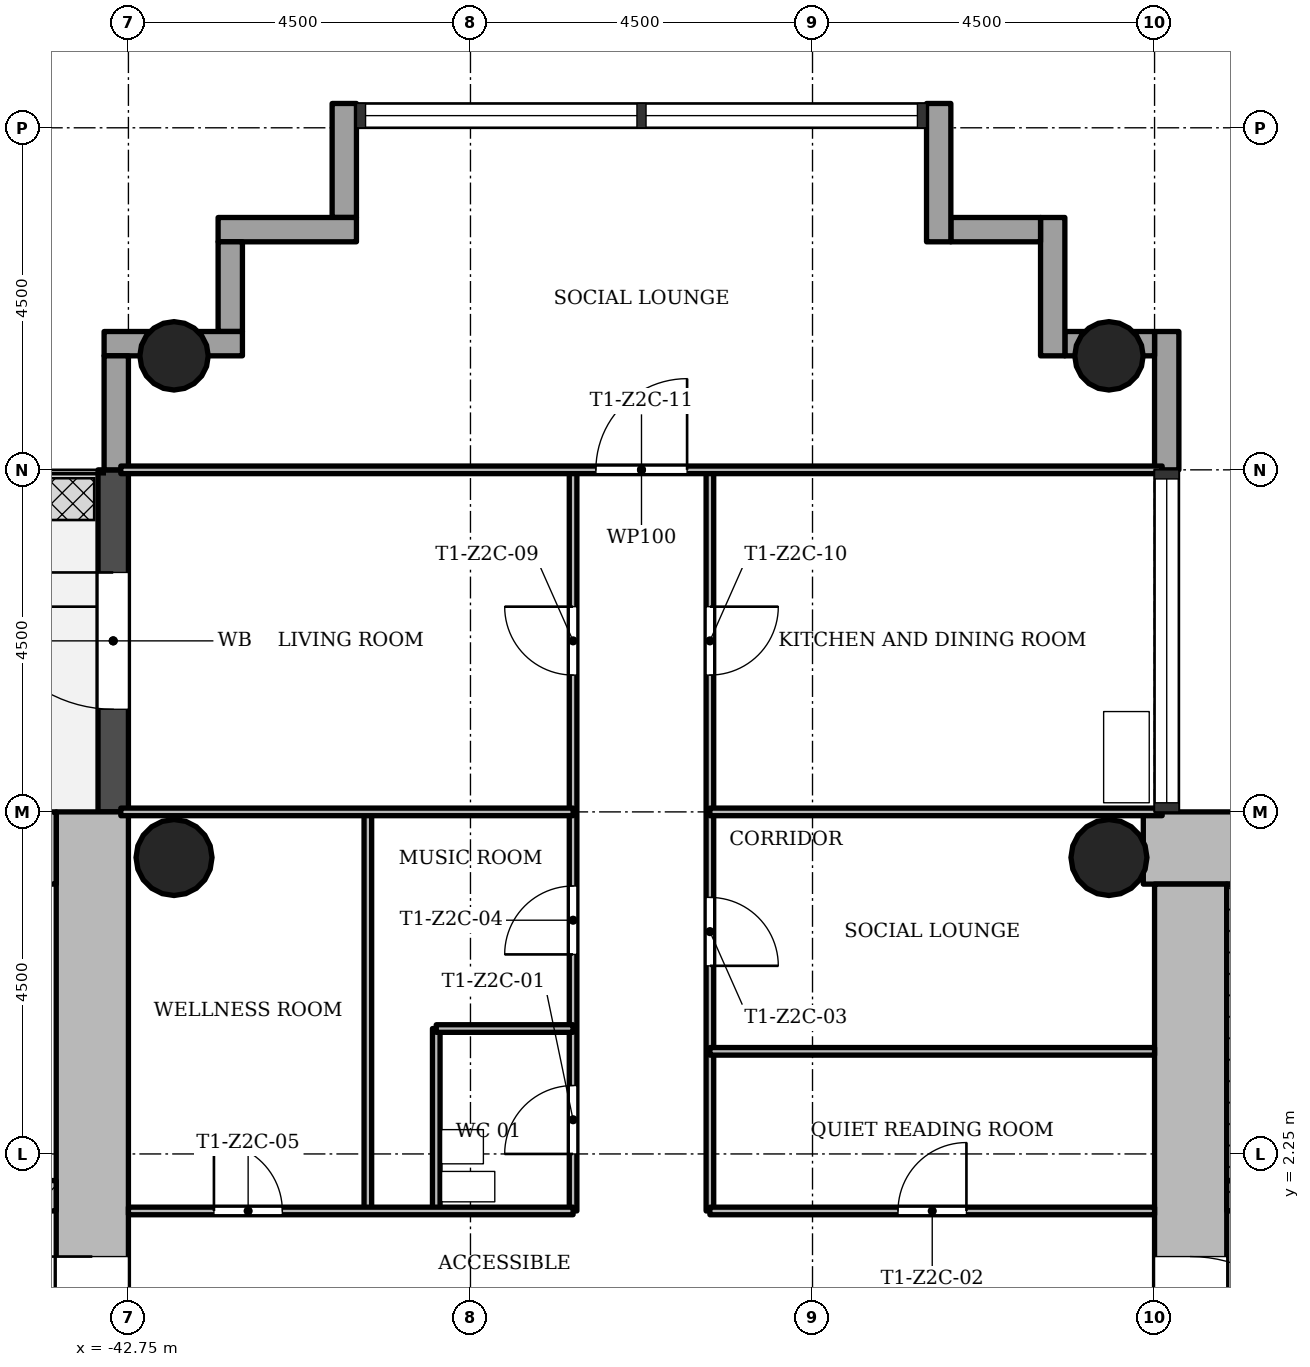
"""IFC4 building model, lengths in metres.
Left out: names, types, materials, properties, quantities, classifications, styles, units other than length and angle.
Written with IfcOpenShell. Run it as: python <this file> out.ifc"""

import sys

from ifc_helpers import new_model, si_unit, direction, frame, frame_2d, origin, origin_2d, place, context, subcontext, project, spatial, rectangle, hollow_circle, extrude, element, fill, save


model = new_model("IFC4")
c1 = context("Model", 3, precision=1e-05, world=origin(), true_north=direction((0.0, 1.0)))
c2 = subcontext(c1, "Body", "Model", "MODEL_VIEW")
j1 = project(units=[si_unit("LENGTHUNIT", "METRE"), si_unit("PLANEANGLEUNIT", "RADIAN")], contexts=[c1])
p1 = place(None, origin())
s1 = spatial("IfcSite", under=j1, at=p1, CompositionType="ELEMENT")
p2 = place(p1, origin())
s2 = spatial("IfcBuilding", under=s1, at=p2, CompositionType="ELEMENT")
p3 = place(p2, frame((0.0, 0.0, 90.2)))
s3 = spatial("IfcBuildingStorey", under=s2, at=p3, CompositionType="ELEMENT", Elevation=90.2)
p4 = place(p3, frame((-20.702, 6.275, 0.0), z_axis=(0.0, 0.0, 1.0), x_axis=(-1.0, 0.0, 0.0)))
e1 = element("IfcWall", 1, at=p4, inside=s3, PredefinedType="SHEAR", context=c2, shape_type="SweptSolid", body=[
    extrude(rectangle(XDim=8.696, YDim=0.95, at=frame_2d((4.348, 0.0))), origin(), (0.0, 0.0, 1.0), 3.4),
])
p5 = place(p3, frame((-28.775, 5.8, 0.0), z_axis=(0.0, 0.0, 1.0), x_axis=(0.0, -1.0, 0.0)))
e2 = element("IfcWall", 2, at=p5, inside=s3, PredefinedType="SHEAR", context=c2, shape_type="SweptSolid", body=[
    extrude(rectangle(XDim=12.55, YDim=0.95, at=frame_2d((6.275, 0.0))), origin(), (0.0, 0.0, 1.0), 3.4),
])
p6 = place(p5, frame((4.9, 0.0, 0.0)))
e3 = element("IfcOpeningElement", 3, at=p6, cuts=e2, PredefinedType="OPENING", context=c2, shape_type="SweptSolid", body=[
    extrude(rectangle(XDim=1.8, YDim=2.1, at=frame_2d((0.9, 1.05))), frame((0.0, 0.485, 0.0), z_axis=(0.0, -1.0, 0.0), x_axis=(1.0, 0.0, 0.0)), (0.0, 0.0, 1.0), 0.97),
])
p7 = place(p3, frame((-28.3, 1.7, 0.0), z_axis=(0.0, 0.0, 1.0), x_axis=(1.0, 0.0, 0.0)))
e4 = element("IfcWall", 4, at=p7, inside=s3, PredefinedType="SHEAR", context=c2, shape_type="SweptSolid", body=[
    extrude(rectangle(XDim=7.1, YDim=0.4, at=frame_2d((3.55, 0.0))), origin(), (0.0, 0.0, 1.0), 3.4),
])
p8 = place(p7, frame((0.7, 0.0, 0.0)))
e5 = element("IfcOpeningElement", 5, at=p8, cuts=e4, PredefinedType="OPENING", context=c2, shape_type="SweptSolid", body=[
    extrude(rectangle(XDim=0.9, YDim=2.1, at=frame_2d((0.45, 1.05))), frame((0.0, 0.21, 0.0), z_axis=(0.0, -1.0, 0.0), x_axis=(1.0, 0.0, 0.0)), (0.0, 0.0, 1.0), 0.42),
])
p9 = place(p3, frame((-43.225, -5.8, 0.0), z_axis=(0.0, 0.0, 1.0), x_axis=(0.0, 1.0, 0.0)))
e6 = element("IfcWall", 6, at=p9, inside=s3, PredefinedType="SHEAR", context=c2, shape_type="SweptSolid", body=[
    extrude(rectangle(XDim=12.55, YDim=0.95, at=frame_2d((6.275, 0.0))), origin(), (0.0, 0.0, 1.0), 3.4),
])
p10 = place(p9, frame((4.9, 0.0, 0.0)))
e7 = element("IfcOpeningElement", 7, at=p10, cuts=e6, PredefinedType="OPENING", context=c2, shape_type="SweptSolid", body=[
    extrude(rectangle(XDim=1.8, YDim=2.1, at=frame_2d((0.9, 1.05))), frame((0.0, 0.485, 0.0), z_axis=(0.0, -1.0, 0.0), x_axis=(1.0, 0.0, 0.0)), (0.0, 0.0, 1.0), 0.97),
])
p11 = place(p3, frame((-43.7, 6.275, 0.0), z_axis=(0.0, 0.0, 1.0), x_axis=(-1.0, 0.0, 0.0)))
e8 = element("IfcWall", 8, at=p11, inside=s3, PredefinedType="SHEAR", context=c2, shape_type="SweptSolid", body=[
    extrude(rectangle(XDim=8.05, YDim=0.95, at=frame_2d((4.025, 0.0))), origin(), (0.0, 0.0, 1.0), 3.4),
])
p12 = place(p3, frame((-50.8, 1.7, 0.0), z_axis=(0.0, 0.0, 1.0), x_axis=(1.0, 0.0, 0.0)))
e9 = element("IfcWall", 9, at=p12, inside=s3, PredefinedType="SHEAR", context=c2, shape_type="SweptSolid", body=[
    extrude(rectangle(XDim=7.1, YDim=0.4, at=frame_2d((3.55, 0.0))), origin(), (0.0, 0.0, 1.0), 3.4),
])
p13 = place(p12, frame((5.2, 0.0, 0.0)))
e10 = element("IfcOpeningElement", 10, at=p13, cuts=e9, PredefinedType="OPENING", context=c2, shape_type="SweptSolid", body=[
    extrude(rectangle(XDim=1.1, YDim=2.1, at=frame_2d((0.55, 1.05))), frame((0.0, 0.21, 0.0), z_axis=(0.0, -1.0, 0.0), x_axis=(1.0, 0.0, 0.0)), (0.0, 0.0, 1.0), 0.42),
])
for number, where, z_axis, x_axis in (
    (11, (-29.85, 12.75, 0.0), (0.0, 0.0, 1.0), (1.0, 0.0, 0.0)),
    (12, (-42.15, 12.75, 0.0), (0.0, 0.0, 1.0), (1.0, 0.0, 0.0)),
):
    element("IfcColumn", number, at=place(p3, frame(where, z_axis=z_axis, x_axis=x_axis)), inside=s3, PredefinedType="COLUMN", context=c2, shape_type="SweptSolid", body=[
        extrude(hollow_circle(Radius=0.45, WallThickness=0.032, at=origin_2d()), origin(), (0.0, 0.0, 1.0), 3.4),
    ])
for number, where, z_axis, x_axis in (
    (13, (-29.85, 6.15, 0.0), (0.0, 0.0, 1.0), (1.0, 0.0, 0.0)),
    (14, (-42.15, 6.15, 0.0), (0.0, 0.0, 1.0), (1.0, 0.0, 0.0)),
):
    element("IfcColumn", number, at=place(p3, frame(where, z_axis=z_axis, x_axis=x_axis)), inside=s3, PredefinedType="COLUMN", context=c2, shape_type="SweptSolid", body=[
        extrude(hollow_circle(Radius=0.5, WallThickness=0.036, at=origin_2d()), origin(), (0.0, 0.0, 1.0), 3.4),
    ])
p14 = place(p3, frame((-29.09, 11.25, -0.3), z_axis=(0.0, 0.0, 1.0), x_axis=(0.0, 1.0, 0.0)))
e15 = element("IfcWall", 15, at=p14, inside=s3, PredefinedType="STANDARD", context=c2, shape_type="SweptSolid", body=[
    extrude(rectangle(XDim=1.82, YDim=0.32, at=frame_2d((0.91, 0.0))), origin(), (0.0, 0.0, 1.0), 3.4),
])
p15 = place(p3, frame((-29.25, 12.91, -0.3), z_axis=(0.0, 0.0, 1.0), x_axis=(-1.0, 0.0, 0.0)))
e16 = element("IfcWall", 16, at=p15, inside=s3, PredefinedType="STANDARD", context=c2, shape_type="SweptSolid", body=[
    extrude(rectangle(XDim=1.18, YDim=0.32, at=frame_2d((0.59, 0.0))), origin(), (0.0, 0.0, 1.0), 3.4),
])
p16 = place(p3, frame((-30.59, 12.75, -0.3), z_axis=(0.0, 0.0, 1.0), x_axis=(0.0, 1.0, 0.0)))
e17 = element("IfcWall", 17, at=p16, inside=s3, PredefinedType="STANDARD", context=c2, shape_type="SweptSolid", body=[
    extrude(rectangle(XDim=1.82, YDim=0.32, at=frame_2d((0.91, 0.0))), origin(), (0.0, 0.0, 1.0), 3.4),
])
p17 = place(p3, frame((-30.75, 14.41, -0.3), z_axis=(0.0, 0.0, 1.0), x_axis=(-1.0, 0.0, 0.0)))
e18 = element("IfcWall", 18, at=p17, inside=s3, PredefinedType="STANDARD", context=c2, shape_type="SweptSolid", body=[
    extrude(rectangle(XDim=1.18, YDim=0.32, at=frame_2d((0.59, 0.0))), origin(), (0.0, 0.0, 1.0), 3.4),
])
p18 = place(p3, frame((-32.09, 14.25, -0.3), z_axis=(0.0, 0.0, 1.0), x_axis=(0.0, 1.0, 0.0)))
e19 = element("IfcWall", 19, at=p18, inside=s3, PredefinedType="STANDARD", context=c2, shape_type="SweptSolid", body=[
    extrude(rectangle(XDim=1.82, YDim=0.32, at=frame_2d((0.91, 0.0))), origin(), (0.0, 0.0, 1.0), 3.4),
])
p19 = place(p3, frame((-39.91, 16.07, -0.3), z_axis=(0.0, 0.0, 1.0), x_axis=(0.0, -1.0, 0.0)))
e20 = element("IfcWall", 20, at=p19, inside=s3, PredefinedType="STANDARD", context=c2, shape_type="SweptSolid", body=[
    extrude(rectangle(XDim=1.5, YDim=0.32, at=frame_2d((0.75, 0.0))), origin(), (0.0, 0.0, 1.0), 3.4),
])
p20 = place(p3, frame((-39.75, 14.41, -0.3), z_axis=(0.0, 0.0, 1.0), x_axis=(-1.0, 0.0, 0.0)))
e21 = element("IfcWall", 21, at=p20, inside=s3, PredefinedType="STANDARD", context=c2, shape_type="SweptSolid", body=[
    extrude(rectangle(XDim=1.82, YDim=0.32, at=frame_2d((0.91, 0.0))), origin(), (0.0, 0.0, 1.0), 3.4),
])
p21 = place(p3, frame((-41.41, 14.25, -0.3), z_axis=(0.0, 0.0, 1.0), x_axis=(0.0, -1.0, 0.0)))
e22 = element("IfcWall", 22, at=p21, inside=s3, PredefinedType="STANDARD", context=c2, shape_type="SweptSolid", body=[
    extrude(rectangle(XDim=1.18, YDim=0.32, at=frame_2d((0.59, 0.0))), origin(), (0.0, 0.0, 1.0), 3.4),
])
p22 = place(p3, frame((-41.25, 12.91, -0.3), z_axis=(0.0, 0.0, 1.0), x_axis=(-1.0, 0.0, 0.0)))
e23 = element("IfcWall", 23, at=p22, inside=s3, PredefinedType="STANDARD", context=c2, shape_type="SweptSolid", body=[
    extrude(rectangle(XDim=1.82, YDim=0.32, at=frame_2d((0.91, 0.0))), origin(), (0.0, 0.0, 1.0), 3.4),
])
p23 = place(p3, frame((-42.91, 12.75, -0.3), z_axis=(0.0, 0.0, 1.0), x_axis=(0.0, -1.0, 0.0)))
e24 = element("IfcWall", 24, at=p23, inside=s3, PredefinedType="STANDARD", context=c2, shape_type="SweptSolid", body=[
    extrude(rectangle(XDim=1.5, YDim=0.32, at=frame_2d((0.75, 0.0))), origin(), (0.0, 0.0, 1.0), 3.4),
])
p24 = place(p3, frame((-42.95, 11.25, -0.02), z_axis=(0.0, 0.0, 1.0), x_axis=(0.0, -1.0, 0.0)))
e25 = element("IfcWall", 25, at=p24, inside=s3, PredefinedType="STANDARD", context=c2, shape_type="SweptSolid", body=[
    extrude(rectangle(XDim=4.5, YDim=0.4, at=frame_2d((2.25, 0.0))), origin(), (0.0, 0.0, 1.0), 3.12),
])
p25 = place(p24, frame((1.35, 0.0, 0.02)))
e26 = element("IfcOpeningElement", 26, at=p25, cuts=e25, PredefinedType="OPENING", context=c2, shape_type="SweptSolid", body=[
    extrude(rectangle(XDim=1.8, YDim=2.1, at=frame_2d((0.9, 1.05))), frame((0.0, 0.21, 0.0), z_axis=(0.0, -1.0, 0.0), x_axis=(1.0, 0.0, 0.0)), (0.0, 0.0, 1.0), 0.42),
])
p26 = place(p3, frame((-39.6, 1.5, 0.0), z_axis=(0.0, 0.0, 1.0), x_axis=(0.0, 1.0, 0.0)))
e27 = element("IfcWall", 27, at=p26, inside=s3, PredefinedType="PARTITIONING", context=c2, shape_type="SweptSolid", body=[
    extrude(rectangle(XDim=5.25, YDim=0.1, at=frame_2d((2.625, 0.0))), origin(), (0.0, 0.0, 1.0), 3.0),
])
p27 = place(p3, frame((-38.7, 1.5, 0.0), z_axis=(0.0, 0.0, 1.0), x_axis=(0.0, 1.0, 0.0)))
e28 = element("IfcWall", 28, at=p27, inside=s3, PredefinedType="PARTITIONING", context=c2, shape_type="SweptSolid", body=[
    extrude(rectangle(XDim=2.4, YDim=0.1, at=frame_2d((1.2, 0.0))), origin(), (0.0, 0.0, 1.0), 3.0),
])
p28 = place(p3, frame((-36.9, 1.5, 0.0), z_axis=(0.0, 0.0, 1.0), x_axis=(0.0, 1.0, 0.0)))
e29 = element("IfcWall", 29, at=p28, inside=s3, PredefinedType="PARTITIONING", context=c2, shape_type="SweptSolid", body=[
    extrude(rectangle(XDim=9.75, YDim=0.1, at=frame_2d((4.875, 0.0))), origin(), (0.0, 0.0, 1.0), 3.0),
])
p29 = place(p28, frame((0.75, 0.0, 0.0)))
e30 = element("IfcOpeningElement", 30, at=p29, cuts=e29, PredefinedType="OPENING", context=c2, shape_type="SweptSolid", body=[
    extrude(rectangle(XDim=0.9, YDim=2.1, at=frame_2d((0.45, 1.05))), frame((0.0, 0.06, 0.0), z_axis=(0.0, -1.0, 0.0), x_axis=(1.0, 0.0, 0.0)), (0.0, 0.0, 1.0), 0.12),
])
p30 = place(p28, frame((3.375, 0.0, 0.0)))
e31 = element("IfcOpeningElement", 31, at=p30, cuts=e29, PredefinedType="OPENING", context=c2, shape_type="SweptSolid", body=[
    extrude(rectangle(XDim=0.9, YDim=2.1, at=frame_2d((0.45, 1.05))), frame((0.0, 0.06, 0.0), z_axis=(0.0, -1.0, 0.0), x_axis=(1.0, 0.0, 0.0)), (0.0, 0.0, 1.0), 0.12),
])
p31 = place(p28, frame((7.05, 0.0, 0.0)))
e32 = element("IfcOpeningElement", 32, at=p31, cuts=e29, PredefinedType="OPENING", context=c2, shape_type="SweptSolid", body=[
    extrude(rectangle(XDim=0.9, YDim=2.1, at=frame_2d((0.45, 1.05))), frame((0.0, 0.06, 0.0), z_axis=(0.0, -1.0, 0.0), x_axis=(1.0, 0.0, 0.0)), (0.0, 0.0, 1.0), 0.12),
])
p32 = place(p3, frame((-35.1, 1.5, 0.0), z_axis=(0.0, 0.0, 1.0), x_axis=(0.0, 1.0, 0.0)))
e33 = element("IfcWall", 33, at=p32, inside=s3, PredefinedType="PARTITIONING", context=c2, shape_type="SweptSolid", body=[
    extrude(rectangle(XDim=9.75, YDim=0.1, at=frame_2d((4.875, 0.0))), origin(), (0.0, 0.0, 1.0), 3.0),
])
p33 = place(p32, frame((3.225, 0.0, 0.0)))
e34 = element("IfcOpeningElement", 34, at=p33, cuts=e33, PredefinedType="OPENING", context=c2, shape_type="SweptSolid", body=[
    extrude(rectangle(XDim=0.9, YDim=2.1, at=frame_2d((0.45, 1.05))), frame((0.0, 0.06, 0.0), z_axis=(0.0, -1.0, 0.0), x_axis=(1.0, 0.0, 0.0)), (0.0, 0.0, 1.0), 0.12),
])
p34 = place(p32, frame((7.05, 0.0, 0.0)))
e35 = element("IfcOpeningElement", 35, at=p34, cuts=e33, PredefinedType="OPENING", context=c2, shape_type="SweptSolid", body=[
    extrude(rectangle(XDim=0.9, YDim=2.1, at=frame_2d((0.45, 1.05))), frame((0.0, 0.06, 0.0), z_axis=(0.0, -1.0, 0.0), x_axis=(1.0, 0.0, 0.0)), (0.0, 0.0, 1.0), 0.12),
])
p35 = place(p3, frame((-42.75, 1.5, 0.0), z_axis=(0.0, 0.0, 1.0), x_axis=(1.0, 0.0, 0.0)))
e36 = element("IfcWall", 36, at=p35, inside=s3, PredefinedType="PARTITIONING", context=c2, shape_type="SweptSolid", body=[
    extrude(rectangle(XDim=5.85, YDim=0.1, at=frame_2d((2.925, 0.0))), origin(), (0.0, 0.0, 1.0), 3.0),
])
p36 = place(p35, frame((1.125, 0.0, 0.0)))
e37 = element("IfcOpeningElement", 37, at=p36, cuts=e36, PredefinedType="OPENING", context=c2, shape_type="SweptSolid", body=[
    extrude(rectangle(XDim=0.9, YDim=2.1, at=frame_2d((0.45, 1.05))), frame((0.0, 0.06, 0.0), z_axis=(0.0, -1.0, 0.0), x_axis=(1.0, 0.0, 0.0)), (0.0, 0.0, 1.0), 0.12),
])
p37 = place(p3, frame((-35.1, 1.5, 0.0), z_axis=(0.0, 0.0, 1.0), x_axis=(1.0, 0.0, 0.0)))
e38 = element("IfcWall", 38, at=p37, inside=s3, PredefinedType="PARTITIONING", context=c2, shape_type="SweptSolid", body=[
    extrude(rectangle(XDim=5.85, YDim=0.1, at=frame_2d((2.925, 0.0))), origin(), (0.0, 0.0, 1.0), 3.0),
])
p38 = place(p37, frame((2.475, 0.0, 0.0)))
e39 = element("IfcOpeningElement", 39, at=p38, cuts=e38, PredefinedType="OPENING", context=c2, shape_type="SweptSolid", body=[
    extrude(rectangle(XDim=0.9, YDim=2.1, at=frame_2d((0.45, 1.05))), frame((0.0, 0.06, 0.0), z_axis=(0.0, -1.0, 0.0), x_axis=(1.0, 0.0, 0.0)), (0.0, 0.0, 1.0), 0.12),
])
p39 = place(p3, frame((-35.1, 3.6, 0.0), z_axis=(0.0, 0.0, 1.0), x_axis=(1.0, 0.0, 0.0)))
e40 = element("IfcWall", 40, at=p39, inside=s3, PredefinedType="PARTITIONING", context=c2, shape_type="SweptSolid", body=[
    extrude(rectangle(XDim=5.85, YDim=0.1, at=frame_2d((2.925, 0.0))), origin(), (0.0, 0.0, 1.0), 3.0),
])
p40 = place(p3, frame((-38.7, 3.9, 0.0), z_axis=(0.0, 0.0, 1.0), x_axis=(1.0, 0.0, 0.0)))
e41 = element("IfcWall", 41, at=p40, inside=s3, PredefinedType="PARTITIONING", context=c2, shape_type="SweptSolid", body=[
    extrude(rectangle(XDim=1.8, YDim=0.1, at=frame_2d((0.9, 0.0))), origin(), (0.0, 0.0, 1.0), 3.0),
])
for number, where, z_axis, x_axis in (
    (42, (-42.85, 6.75, 0.0), (0.0, 0.0, 1.0), (1.0, 0.0, 0.0)),
    (43, (-35.1, 6.75, 0.0), (0.0, 0.0, 1.0), (1.0, 0.0, 0.0)),
):
    element("IfcWall", number, at=place(p3, frame(where, z_axis=z_axis, x_axis=x_axis)), inside=s3, PredefinedType="PARTITIONING", context=c2, shape_type="SweptSolid", body=[
        extrude(rectangle(XDim=5.95, YDim=0.1, at=frame_2d((2.975, 0.0))), origin(), (0.0, 0.0, 1.0), 3.0),
    ])
p41 = place(p3, frame((-42.85, 11.25, 0.0), z_axis=(0.0, 0.0, 1.0), x_axis=(1.0, 0.0, 0.0)))
e44 = element("IfcWall", 44, at=p41, inside=s3, PredefinedType="PARTITIONING", context=c2, shape_type="SweptSolid", body=[
    extrude(rectangle(XDim=13.7, YDim=0.1, at=frame_2d((6.85, 0.0))), origin(), (0.0, 0.0, 1.0), 3.0),
])
p42 = place(p41, frame((6.25, 0.0, 0.0)))
e45 = element("IfcOpeningElement", 45, at=p42, cuts=e44, PredefinedType="OPENING", context=c2, shape_type="SweptSolid", body=[
    extrude(rectangle(XDim=1.2, YDim=2.1, at=frame_2d((0.6, 1.05))), frame((0.0, 0.06, 0.0), z_axis=(0.0, -1.0, 0.0), x_axis=(1.0, 0.0, 0.0)), (0.0, 0.0, 1.0), 0.12),
])
p43 = place(p3, frame((-28.175, 1.9, 0.0), z_axis=(0.0, 0.0, 1.0), x_axis=(0.0, 1.0, 0.0)))
e46 = element("IfcWall", 46, at=p43, inside=s3, PredefinedType="SHEAR", context=c2, shape_type="SweptSolid", body=[
    extrude(rectangle(XDim=3.9, YDim=0.25, at=frame_2d((1.95, 0.0))), origin(), (0.0, 0.0, 1.0), 3.4),
])
p44 = place(p25, origin())
e47 = element("IfcDoor", 47, at=p44, inside=s3, OperationType="SINGLE_SWING_LEFT", PredefinedType="DOOR", context=c2, shape_type="SweptSolid", body=[
    extrude(rectangle(XDim=1.8, YDim=2.1, at=frame_2d((0.9, 1.05))), frame((0.0, 0.025, 0.0), z_axis=(0.0, -1.0, 0.0), x_axis=(1.0, 0.0, 0.0)), (0.0, 0.0, 1.0), 0.05),
])
fill(e26, e47)
p45 = place(p29, origin())
e48 = element("IfcDoor", 48, at=p45, inside=s3, OperationType="SINGLE_SWING_RIGHT", PredefinedType="DOOR", context=c2, shape_type="SweptSolid", body=[
    extrude(rectangle(XDim=0.9, YDim=2.1, at=frame_2d((0.45, 1.05))), frame((0.0, 0.025, 0.0), z_axis=(0.0, -1.0, 0.0), x_axis=(1.0, 0.0, 0.0)), (0.0, 0.0, 1.0), 0.05),
])
fill(e30, e48)
p46 = place(p38, origin())
e49 = element("IfcDoor", 49, at=p46, inside=s3, OperationType="SINGLE_SWING_LEFT", PredefinedType="DOOR", context=c2, shape_type="SweptSolid", body=[
    extrude(rectangle(XDim=0.9, YDim=2.1, at=frame_2d((0.45, 1.05))), frame((0.0, 0.025, 0.0), z_axis=(0.0, -1.0, 0.0), x_axis=(1.0, 0.0, 0.0)), (0.0, 0.0, 1.0), 0.05),
])
fill(e39, e49)
p47 = place(p33, origin())
e50 = element("IfcDoor", 50, at=p47, inside=s3, OperationType="SINGLE_SWING_LEFT", PredefinedType="DOOR", context=c2, shape_type="SweptSolid", body=[
    extrude(rectangle(XDim=0.9, YDim=2.1, at=frame_2d((0.45, 1.05))), frame((0.0, 0.025, 0.0), z_axis=(0.0, -1.0, 0.0), x_axis=(1.0, 0.0, 0.0)), (0.0, 0.0, 1.0), 0.05),
])
fill(e34, e50)
p48 = place(p30, origin())
e51 = element("IfcDoor", 51, at=p48, inside=s3, OperationType="SINGLE_SWING_RIGHT", PredefinedType="DOOR", context=c2, shape_type="SweptSolid", body=[
    extrude(rectangle(XDim=0.9, YDim=2.1, at=frame_2d((0.45, 1.05))), frame((0.0, 0.025, 0.0), z_axis=(0.0, -1.0, 0.0), x_axis=(1.0, 0.0, 0.0)), (0.0, 0.0, 1.0), 0.05),
])
fill(e31, e51)
p49 = place(p36, origin())
e52 = element("IfcDoor", 52, at=p49, inside=s3, OperationType="SINGLE_SWING_RIGHT", PredefinedType="DOOR", context=c2, shape_type="SweptSolid", body=[
    extrude(rectangle(XDim=0.9, YDim=2.1, at=frame_2d((0.45, 1.05))), frame((0.0, 0.025, 0.0), z_axis=(0.0, -1.0, 0.0), x_axis=(1.0, 0.0, 0.0)), (0.0, 0.0, 1.0), 0.05),
])
fill(e37, e52)
p50 = place(p31, origin())
e53 = element("IfcDoor", 53, at=p50, inside=s3, OperationType="SINGLE_SWING_LEFT", PredefinedType="DOOR", context=c2, shape_type="SweptSolid", body=[
    extrude(rectangle(XDim=0.9, YDim=2.1, at=frame_2d((0.45, 1.05))), frame((0.0, 0.025, 0.0), z_axis=(0.0, -1.0, 0.0), x_axis=(1.0, 0.0, 0.0)), (0.0, 0.0, 1.0), 0.05),
])
fill(e32, e53)
p51 = place(p34, origin())
e54 = element("IfcDoor", 54, at=p51, inside=s3, OperationType="SINGLE_SWING_RIGHT", PredefinedType="DOOR", context=c2, shape_type="SweptSolid", body=[
    extrude(rectangle(XDim=0.9, YDim=2.1, at=frame_2d((0.45, 1.05))), frame((0.0, 0.025, 0.0), z_axis=(0.0, -1.0, 0.0), x_axis=(1.0, 0.0, 0.0)), (0.0, 0.0, 1.0), 0.05),
])
fill(e35, e54)
p52 = place(p42, origin())
e55 = element("IfcDoor", 55, at=p52, inside=s3, OperationType="SINGLE_SWING_LEFT", PredefinedType="DOOR", context=c2, shape_type="SweptSolid", body=[
    extrude(rectangle(XDim=1.2, YDim=2.1, at=frame_2d((0.6, 1.05))), frame((0.0, 0.025, 0.0), z_axis=(0.0, -1.0, 0.0), x_axis=(1.0, 0.0, 0.0)), (0.0, 0.0, 1.0), 0.05),
])
fill(e45, e55)
p53 = place(p6, origin())
e56 = element("IfcDoor", 56, at=p53, inside=s3, OperationType="SINGLE_SWING_LEFT", PredefinedType="DOOR", context=c2, shape_type="SweptSolid", body=[
    extrude(rectangle(XDim=1.8, YDim=2.1, at=frame_2d((0.9, 1.05))), frame((0.0, 0.025, 0.0), z_axis=(0.0, -1.0, 0.0), x_axis=(1.0, 0.0, 0.0)), (0.0, 0.0, 1.0), 0.05),
])
fill(e3, e56)
p54 = place(p10, origin())
e57 = element("IfcDoor", 57, at=p54, inside=s3, OperationType="SINGLE_SWING_LEFT", PredefinedType="DOOR", context=c2, shape_type="SweptSolid", body=[
    extrude(rectangle(XDim=1.8, YDim=2.1, at=frame_2d((0.9, 1.05))), frame((0.0, 0.025, 0.0), z_axis=(0.0, -1.0, 0.0), x_axis=(1.0, 0.0, 0.0)), (0.0, 0.0, 1.0), 0.05),
])
fill(e7, e57)
save(model, sys.argv[1])
